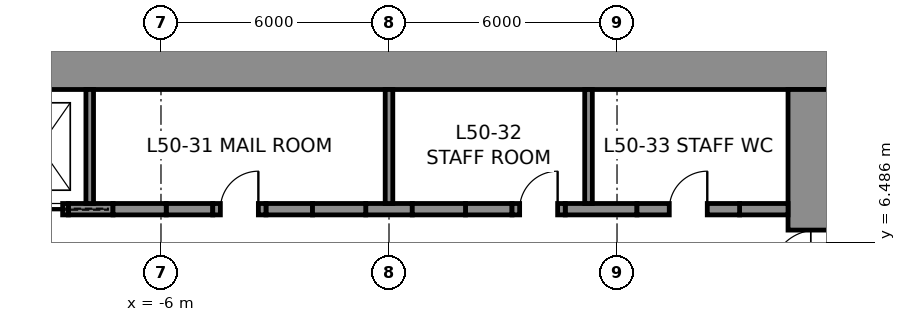
"""IFC4 building model, lengths in metres.
Left out: names, types, materials, properties, quantities, classifications, styles, units other than length and angle.
Written with IfcOpenShell. Run it as: python <this file> out.ifc"""

import sys

from ifc_helpers import new_model, si_unit, direction, frame, frame_2d, origin, place, context, subcontext, project, spatial, rectangle, extrude, element, fill, save


model = new_model("IFC4")
c1 = context("Model", 3, precision=1e-05, world=origin(), true_north=direction((0.0, 1.0)))
c2 = subcontext(c1, "Body", "Model", "MODEL_VIEW")
j1 = project(units=[si_unit("LENGTHUNIT", "METRE"), si_unit("PLANEANGLEUNIT", "RADIAN")], contexts=[c1])
p1 = place(None, origin())
s1 = spatial("IfcSite", under=j1, at=p1, CompositionType="ELEMENT")
p2 = place(p1, origin())
s2 = spatial("IfcBuilding", under=s1, at=p2, CompositionType="ELEMENT")
p3 = place(p2, frame((0.0, 0.0, 229.8)))
s3 = spatial("IfcBuildingStorey", under=s2, at=p3, CompositionType="ELEMENT", Elevation=229.8)
p4 = place(p3, frame((-12.0, 11.25, 0.0), z_axis=(0.0, 0.0, 1.0), x_axis=(1.0, 0.0, 0.0)))
e1 = element("IfcWall", 1, at=p4, inside=s3, PredefinedType="SHEAR", context=c2, shape_type="SweptSolid", body=[
    extrude(rectangle(XDim=24.0, YDim=1.5, at=frame_2d((12.0, 0.0))), origin(), (0.0, 0.0, 1.0), 4.0),
])
p5 = place(p3, frame((11.25, 10.5, 0.0), z_axis=(0.0, 0.0, 1.0), x_axis=(0.0, -1.0, 0.0)))
e2 = element("IfcWall", 2, at=p5, inside=s3, PredefinedType="SHEAR", context=c2, shape_type="SweptSolid", body=[
    extrude(rectangle(XDim=21.0, YDim=1.5, at=frame_2d((10.5, 0.0))), origin(), (0.0, 0.0, 1.0), 4.0),
])
p6 = place(p5, frame((3.7, 0.0, 0.0)))
e3 = element("IfcOpeningElement", 3, at=p6, cuts=e2, PredefinedType="OPENING", context=c2, shape_type="SweptSolid", body=[
    extrude(rectangle(XDim=1.2, YDim=2.3, at=frame_2d((0.6, 1.15))), frame((0.0, 0.76, 0.0), z_axis=(0.0, -1.0, 0.0), x_axis=(1.0, 0.0, 0.0)), (0.0, 0.0, 1.0), 1.52),
])
p7 = place(p5, frame((16.1, 0.0, 0.0)))
e4 = element("IfcOpeningElement", 4, at=p7, cuts=e2, PredefinedType="OPENING", context=c2, shape_type="SweptSolid", body=[
    extrude(rectangle(XDim=1.2, YDim=2.3, at=frame_2d((0.6, 1.15))), frame((0.0, 0.76, 0.0), z_axis=(0.0, -1.0, 0.0), x_axis=(1.0, 0.0, 0.0)), (0.0, 0.0, 1.0), 1.52),
])
p8 = place(p3, frame((-8.438, 7.35, 0.0), z_axis=(0.0, 0.0, 1.0), x_axis=(1.0, 0.0, 0.0)))
e5 = element("IfcWall", 5, at=p8, inside=s3, PredefinedType="SHEAR", context=c2, shape_type="SweptSolid", body=[
    extrude(rectangle(XDim=1.175, YDim=0.3, at=frame_2d((0.587, 0.0))), origin(), (0.0, 0.0, 1.0), 4.0),
])
for number, where, z_axis, x_axis in (
    (6, (-5.863, 7.35, 0.0), (0.0, 0.0, 1.0), (1.0, 0.0, 0.0)),
    (7, (-3.238, 7.35, 0.0), (0.0, 0.0, 1.0), (1.0, 0.0, 0.0)),
    (8, (-0.613, 7.35, 0.0), (0.0, 0.0, 1.0), (1.0, 0.0, 0.0)),
    (9, (2.012, 7.35, 0.0), (0.0, 0.0, 1.0), (1.0, 0.0, 0.0)),
):
    element("IfcWall", number, at=place(p3, frame(where, z_axis=z_axis, x_axis=x_axis)), inside=s3, PredefinedType="SHEAR", context=c2, shape_type="SweptSolid", body=[
        extrude(rectangle(XDim=1.225, YDim=0.3, at=frame_2d((0.613, 0.0))), origin(), (0.0, 0.0, 1.0), 4.0),
    ])
p9 = place(p3, frame((4.637, 7.35, 0.0), z_axis=(0.0, 0.0, 1.0), x_axis=(1.0, 0.0, 0.0)))
e10 = element("IfcWall", 10, at=p9, inside=s3, PredefinedType="SHEAR", context=c2, shape_type="SweptSolid", body=[
    extrude(rectangle(XDim=1.887, YDim=0.3, at=frame_2d((0.944, 0.0))), origin(), (0.0, 0.0, 1.0), 4.0),
])
p10 = place(p3, frame((9.225, 7.35, 0.0), z_axis=(0.0, 0.0, 1.0), x_axis=(1.0, 0.0, 0.0)))
e11 = element("IfcWall", 11, at=p10, inside=s3, PredefinedType="SHEAR", context=c2, shape_type="SweptSolid", body=[
    extrude(rectangle(XDim=1.275, YDim=0.3, at=frame_2d((0.637, 0.0))), origin(), (0.0, 0.0, 1.0), 4.0),
])
p11 = place(p3, frame((-9.938, 7.35, 0.0), z_axis=(0.0, 0.0, 1.0), x_axis=(1.0, 0.0, 0.0)))
e12 = element("IfcWall", 12, at=p11, inside=s3, PredefinedType="PARTITIONING", context=c2, shape_type="SweptSolid", body=[
    extrude(rectangle(XDim=1.5, YDim=0.3, at=frame_2d((0.75, 0.0))), origin(), (0.0, 0.0, 1.0), 4.0),
])
p12 = place(p11, frame((0.15, 0.0, 0.0)))
e13 = element("IfcOpeningElement", 13, at=p12, cuts=e12, PredefinedType="OPENING", context=c2, shape_type="SweptSolid", body=[
    extrude(rectangle(XDim=1.2, YDim=2.3, at=frame_2d((0.6, 1.15))), frame((0.0, 0.16, 0.0), z_axis=(0.0, -1.0, 0.0), x_axis=(1.0, 0.0, 0.0)), (0.0, 0.0, 1.0), 0.32),
])
p13 = place(p3, frame((-7.262, 7.35, 0.0), z_axis=(0.0, 0.0, 1.0), x_axis=(1.0, 0.0, 0.0)))
e14 = element("IfcWall", 14, at=p13, inside=s3, PredefinedType="PARTITIONING", context=c2, shape_type="SweptSolid", body=[
    extrude(rectangle(XDim=1.4, YDim=0.3, at=frame_2d((0.7, 0.0))), origin(), (0.0, 0.0, 1.0), 4.0),
])
p14 = place(p3, frame((-4.637, 7.35, 0.0), z_axis=(0.0, 0.0, 1.0), x_axis=(1.0, 0.0, 0.0)))
e15 = element("IfcWall", 15, at=p14, inside=s3, PredefinedType="PARTITIONING", context=c2, shape_type="SweptSolid", body=[
    extrude(rectangle(XDim=1.4, YDim=0.3, at=frame_2d((0.7, 0.0))), origin(), (0.0, 0.0, 1.0), 4.0),
])
p15 = place(p14, frame((0.2, 0.0, 0.0)))
e16 = element("IfcOpeningElement", 16, at=p15, cuts=e15, PredefinedType="OPENING", context=c2, shape_type="SweptSolid", body=[
    extrude(rectangle(XDim=1.0, YDim=2.3, at=frame_2d((0.5, 1.15))), frame((0.0, 0.16, 0.0), z_axis=(0.0, -1.0, 0.0), x_axis=(1.0, 0.0, 0.0)), (0.0, 0.0, 1.0), 0.32),
])
for number, where, z_axis, x_axis in (
    (17, (-2.012, 7.35, 0.0), (0.0, 0.0, 1.0), (1.0, 0.0, 0.0)),
    (18, (0.613, 7.35, 0.0), (0.0, 0.0, 1.0), (1.0, 0.0, 0.0)),
):
    element("IfcWall", number, at=place(p3, frame(where, z_axis=z_axis, x_axis=x_axis)), inside=s3, PredefinedType="PARTITIONING", context=c2, shape_type="SweptSolid", body=[
        extrude(rectangle(XDim=1.4, YDim=0.3, at=frame_2d((0.7, 0.0))), origin(), (0.0, 0.0, 1.0), 4.0),
    ])
p16 = place(p3, frame((3.238, 7.35, 0.0), z_axis=(0.0, 0.0, 1.0), x_axis=(1.0, 0.0, 0.0)))
e19 = element("IfcWall", 19, at=p16, inside=s3, PredefinedType="PARTITIONING", context=c2, shape_type="SweptSolid", body=[
    extrude(rectangle(XDim=1.4, YDim=0.3, at=frame_2d((0.7, 0.0))), origin(), (0.0, 0.0, 1.0), 4.0),
])
p17 = place(p16, frame((0.2, 0.0, 0.0)))
e20 = element("IfcOpeningElement", 20, at=p17, cuts=e19, PredefinedType="OPENING", context=c2, shape_type="SweptSolid", body=[
    extrude(rectangle(XDim=1.0, YDim=2.3, at=frame_2d((0.5, 1.15))), frame((0.0, 0.16, 0.0), z_axis=(0.0, -1.0, 0.0), x_axis=(1.0, 0.0, 0.0)), (0.0, 0.0, 1.0), 0.32),
])
p18 = place(p3, frame((6.525, 7.35, 0.0), z_axis=(0.0, 0.0, 1.0), x_axis=(1.0, 0.0, 0.0)))
e21 = element("IfcWall", 21, at=p18, inside=s3, PredefinedType="PARTITIONING", context=c2, shape_type="SweptSolid", body=[
    extrude(rectangle(XDim=2.7, YDim=0.3, at=frame_2d((1.35, 0.0))), origin(), (0.0, 0.0, 1.0), 4.0),
])
p19 = place(p18, frame((0.85, 0.0, 0.0)))
e22 = element("IfcOpeningElement", 22, at=p19, cuts=e21, PredefinedType="OPENING", context=c2, shape_type="SweptSolid", body=[
    extrude(rectangle(XDim=1.0, YDim=2.3, at=frame_2d((0.5, 1.15))), frame((0.0, 0.16, 0.0), z_axis=(0.0, -1.0, 0.0), x_axis=(1.0, 0.0, 0.0)), (0.0, 0.0, 1.0), 0.32),
])
for number, where, z_axis, x_axis in (
    (23, (-7.875, 7.5, 0.0), (0.0, 0.0, 1.0), (0.0, 1.0, 0.0)),
    (24, (0.0, 7.5, 0.0), (0.0, 0.0, 1.0), (0.0, 1.0, 0.0)),
    (25, (5.25, 7.5, 0.0), (0.0, 0.0, 1.0), (0.0, 1.0, 0.0)),
):
    element("IfcWall", number, at=place(p3, frame(where, z_axis=z_axis, x_axis=x_axis)), inside=s3, PredefinedType="PARTITIONING", context=c2, shape_type="SweptSolid", body=[
        extrude(rectangle(XDim=3.0, YDim=0.2, at=frame_2d((1.5, 0.0))), origin(), (0.0, 0.0, 1.0), 4.0),
    ])
p20 = place(p15, origin())
e26 = element("IfcDoor", 26, at=p20, inside=s3, OperationType="SINGLE_SWING_RIGHT", PredefinedType="DOOR", context=c2, shape_type="SweptSolid", body=[
    extrude(rectangle(XDim=1.0, YDim=2.3, at=frame_2d((0.5, 1.15))), frame((0.0, 0.025, 0.0), z_axis=(0.0, -1.0, 0.0), x_axis=(1.0, 0.0, 0.0)), (0.0, 0.0, 1.0), 0.05),
])
fill(e16, e26)
p21 = place(p17, origin())
e27 = element("IfcDoor", 27, at=p21, inside=s3, OperationType="SINGLE_SWING_RIGHT", PredefinedType="DOOR", context=c2, shape_type="SweptSolid", body=[
    extrude(rectangle(XDim=1.0, YDim=2.3, at=frame_2d((0.5, 1.15))), frame((0.0, 0.025, 0.0), z_axis=(0.0, -1.0, 0.0), x_axis=(1.0, 0.0, 0.0)), (0.0, 0.0, 1.0), 0.05),
])
fill(e20, e27)
p22 = place(p19, origin())
e28 = element("IfcDoor", 28, at=p22, inside=s3, OperationType="SINGLE_SWING_RIGHT", PredefinedType="DOOR", context=c2, shape_type="SweptSolid", body=[
    extrude(rectangle(XDim=1.0, YDim=2.3, at=frame_2d((0.5, 1.15))), frame((0.0, 0.025, 0.0), z_axis=(0.0, -1.0, 0.0), x_axis=(1.0, 0.0, 0.0)), (0.0, 0.0, 1.0), 0.05),
])
fill(e22, e28)
p23 = place(p6, frame((1.2, 0.0, 0.0), z_axis=(0.0, 0.0, 1.0), x_axis=(-1.0, 0.0, 0.0)))
e29 = element("IfcDoor", 29, at=p23, inside=s3, OperationType="SINGLE_SWING_LEFT", PredefinedType="DOOR", context=c2, shape_type="SweptSolid", body=[
    extrude(rectangle(XDim=1.2, YDim=2.3, at=frame_2d((0.6, 1.15))), frame((0.0, 0.025, 0.0), z_axis=(0.0, -1.0, 0.0), x_axis=(1.0, 0.0, 0.0)), (0.0, 0.0, 1.0), 0.05),
])
fill(e3, e29)
p24 = place(p12, frame((1.2, 0.0, 0.0), z_axis=(0.0, 0.0, 1.0), x_axis=(-1.0, 0.0, 0.0)))
e30 = element("IfcDoor", 30, at=p24, inside=s3, OperationType="SLIDING_TO_LEFT", PredefinedType="DOOR", context=c2, shape_type="SweptSolid", body=[
    extrude(rectangle(XDim=1.2, YDim=2.3, at=frame_2d((0.6, 1.15))), frame((0.0, 0.025, 0.0), z_axis=(0.0, -1.0, 0.0), x_axis=(1.0, 0.0, 0.0)), (0.0, 0.0, 1.0), 0.05),
])
fill(e13, e30)
save(model, sys.argv[1])
